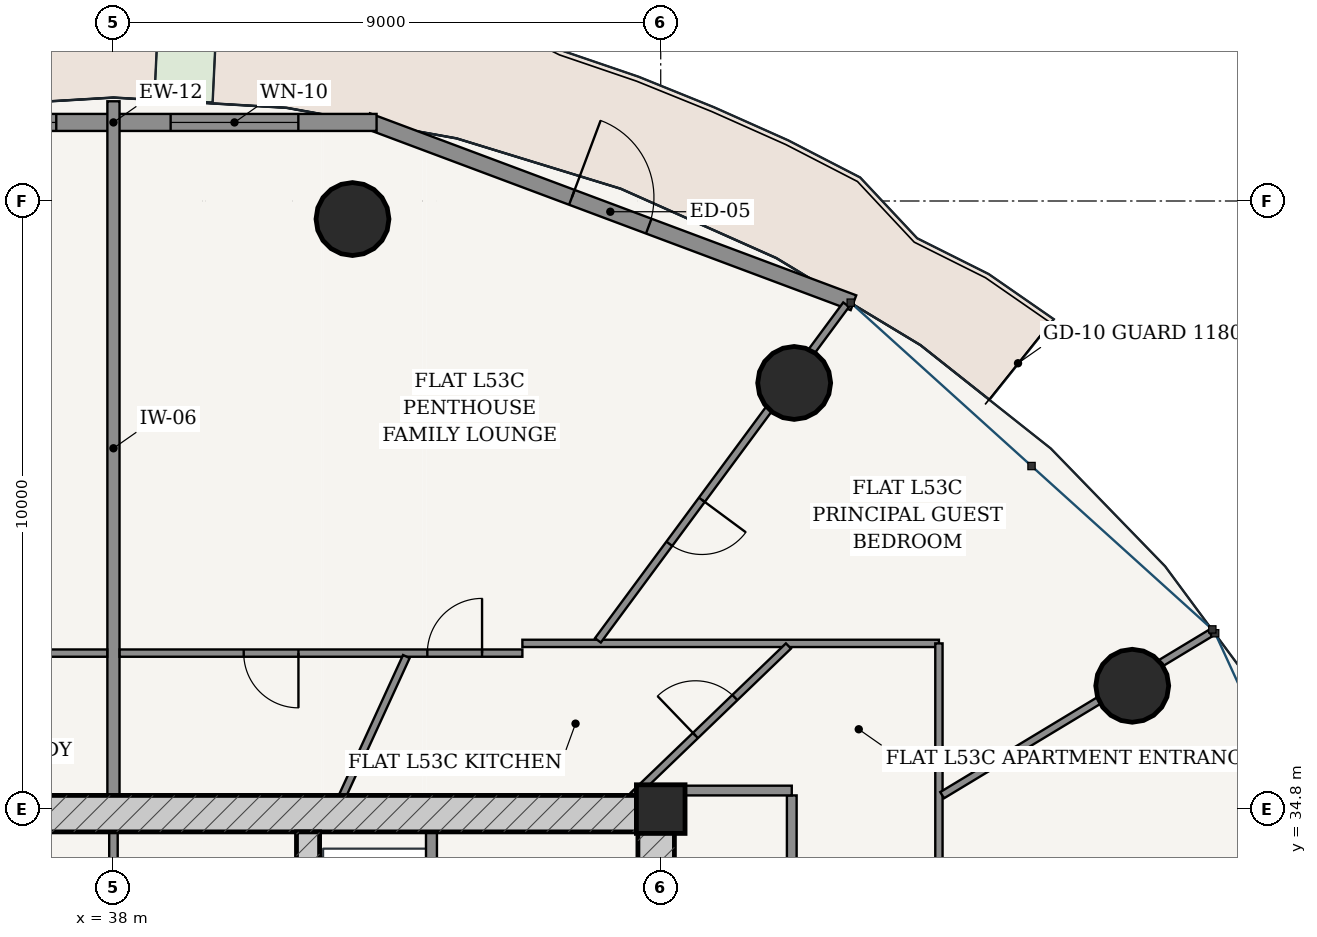
"""IFC4 building model, lengths in metres.
Left out: names, types, materials, properties, quantities, classifications, styles, units other than length and angle.
Written with IfcOpenShell. Run it as: python <this file> out.ifc"""

import sys

from ifc_helpers import new_model, si_unit, direction, frame, frame_2d, origin, origin_2d, place, context, subcontext, project, spatial, rectangle, hollow_circle, extrude, source, transform, mapped, element, fill, save


model = new_model("IFC4")
c1 = context("Model", 3, precision=1e-05, world=origin(), true_north=direction((-0.2419218956, 0.970295726276)))
c2 = subcontext(c1, "Body", "Model", "MODEL_VIEW")
j1 = project(units=[si_unit("LENGTHUNIT", "METRE"), si_unit("PLANEANGLEUNIT", "RADIAN")], contexts=[c1])
p1 = place(None, origin())
s1 = spatial("IfcSite", under=j1, at=p1, CompositionType="ELEMENT")
p2 = place(p1, origin())
s2 = spatial("IfcBuilding", under=s1, at=p2, CompositionType="ELEMENT")
p3 = place(p2, frame((0.0, 0.0, 202.3)))
s3 = spatial("IfcBuildingStorey", under=s2, at=p3, CompositionType="ELEMENT", Elevation=202.3)
p4 = place(p3, frame((47.0, 34.8, 0.0), z_axis=(0.0, 0.0, 1.0), x_axis=(1.0, 0.0, 0.0)))
e1 = element("IfcColumn", 1, at=p4, inside=s3, PredefinedType="COLUMN", context=c2, shape_type="SweptSolid", body=[
    extrude(rectangle(XDim=0.8, YDim=0.8, at=origin_2d()), origin(), (0.0, 0.0, 1.0), 3.7),
])
p5 = place(p3, frame((28.775, 34.725, 0.0), z_axis=(0.0, 0.0, 1.0), x_axis=(1.0, 0.0, 0.0)))
e2 = element("IfcWall", 2, at=p5, inside=s3, PredefinedType="SHEAR", context=c2, shape_type="SweptSolid", body=[
    extrude(rectangle(XDim=18.45, YDim=0.6, at=frame_2d((9.225, 0.0))), origin(), (0.0, 0.0, 1.0), 3.435),
])
p6 = place(p3, frame((46.925, 19.175, 0.0), z_axis=(0.0, 0.0, 1.0), x_axis=(0.0, 1.0, 0.0)))
e3 = element("IfcWall", 3, at=p6, inside=s3, PredefinedType="SHEAR", context=c2, shape_type="SweptSolid", body=[
    extrude(rectangle(XDim=15.25, YDim=0.6, at=frame_2d((7.625, 0.0))), origin(), (0.0, 0.0, 1.0), 3.435),
])
p7 = place(p6, frame((9.875, 0.0, 0.0)))
e4 = element("IfcOpeningElement", 4, at=p7, cuts=e3, PredefinedType="OPENING", context=c2, shape_type="SweptSolid", body=[
    extrude(rectangle(XDim=1.5, YDim=2.2, at=frame_2d((0.75, 1.1))), frame((0.0, 0.31, 0.0), z_axis=(0.0, -1.0, 0.0), x_axis=(1.0, 0.0, 0.0)), (0.0, 0.0, 1.0), 0.62),
])
p8 = place(p3, frame((41.2, 19.175, 0.0), z_axis=(0.0, 0.0, 1.0), x_axis=(0.0, 1.0, 0.0)))
e5 = element("IfcWall", 5, at=p8, inside=s3, PredefinedType="SHEAR", context=c2, shape_type="SweptSolid", body=[
    extrude(rectangle(XDim=15.25, YDim=0.38, at=frame_2d((7.625, 0.0))), origin(), (0.0, 0.0, 1.0), 3.435),
])
p9 = place(p8, frame((7.8, 0.0, 0.0)))
e6 = element("IfcOpeningElement", 6, at=p9, cuts=e5, PredefinedType="OPENING", context=c2, shape_type="SweptSolid", body=[
    extrude(rectangle(XDim=1.05, YDim=2.15, at=frame_2d((0.525, 1.075))), frame((0.0, 0.2, 0.0), z_axis=(0.0, -1.0, 0.0), x_axis=(1.0, 0.0, 0.0)), (0.0, 0.0, 1.0), 0.4),
])
for number, where, z_axis, x_axis in (
    (7, (54.754, 36.828, 0.0), (0.0, 0.0, 1.0), (1.0, 0.0, 0.0)),
    (8, (49.195, 41.808, 0.0), (0.0, 0.0, 1.0), (1.0, 0.0, 0.0)),
    (9, (41.931, 44.503, 0.0), (0.0, 0.0, 1.0), (1.0, 0.0, 0.0)),
):
    element("IfcColumn", number, at=place(p3, frame(where, z_axis=z_axis, x_axis=x_axis)), inside=s3, PredefinedType="COLUMN", context=c2, shape_type="SweptSolid", body=[
        extrude(hollow_circle(Radius=0.6, WallThickness=0.038, at=origin_2d()), origin(), (0.0, 0.0, 1.0), 3.7),
    ])
p10 = place(p3, frame((50.17, 43.127, 0.0), z_axis=(0.0, 0.0, 1.0), x_axis=(-0.936556918375, 0.350515532672, 0.0)))
e10 = element("IfcWall", 10, at=p10, inside=s3, PredefinedType="SOLIDWALL", context=c2, shape_type="SweptSolid", body=[
    extrude(rectangle(XDim=8.539, YDim=0.26, at=frame_2d((4.27, 0.0))), origin(), (0.0, 0.0, 1.0), 3.435),
])
p11 = place(p10, frame((3.594, 0.0, 0.0)))
e11 = element("IfcOpeningElement", 11, at=p11, cuts=e10, PredefinedType="OPENING", context=c2, shape_type="SweptSolid", body=[
    extrude(rectangle(XDim=1.35, YDim=2.2, at=frame_2d((0.675, 1.1))), frame((0.0, 0.14, 0.0), z_axis=(0.0, -1.0, 0.0), x_axis=(1.0, 0.0, 0.0)), (0.0, 0.0, 1.0), 0.28),
])
p12 = place(p3, frame((42.327, 46.092, 0.0), z_axis=(0.0, 0.0, 1.0), x_axis=(-1.0, 0.0, 0.0)))
e12 = element("IfcWall", 12, at=p12, inside=s3, PredefinedType="SOLIDWALL", context=c2, shape_type="SweptSolid", body=[
    extrude(rectangle(XDim=8.654, YDim=0.28, at=frame_2d((4.327, 0.0))), origin(), (0.0, 0.0, 1.0), 3.435),
])
p13 = place(p12, frame((1.287, 0.0, 0.85)))
e13 = element("IfcOpeningElement", 13, at=p13, cuts=e12, PredefinedType="OPENING", context=c2, shape_type="SweptSolid", body=[
    extrude(rectangle(XDim=2.1, YDim=1.95, at=frame_2d((1.05, 0.975))), frame((0.0, 0.15, 0.0), z_axis=(0.0, -1.0, 0.0), x_axis=(1.0, 0.0, 0.0)), (0.0, 0.0, 1.0), 0.3),
])
p14 = place(p12, frame((5.268, 0.0, 0.85)))
e14 = element("IfcOpeningElement", 14, at=p14, cuts=e12, PredefinedType="OPENING", context=c2, shape_type="SweptSolid", body=[
    extrude(rectangle(XDim=2.1, YDim=1.95, at=frame_2d((1.05, 0.975))), frame((0.0, 0.15, 0.0), z_axis=(0.0, -1.0, 0.0), x_axis=(1.0, 0.0, 0.0)), (0.0, 0.0, 1.0), 0.3),
])
p15 = place(p3, frame((43.23, 28.52, 0.0), z_axis=(0.0, 0.0, 1.0), x_axis=(0.0, 1.0, 0.0)))
e15 = element("IfcWall", 15, at=p15, inside=s3, PredefinedType="PARTITIONING", context=c2, shape_type="SweptSolid", body=[
    extrude(rectangle(XDim=5.905, YDim=0.18, at=frame_2d((2.953, 0.0))), origin(), (0.0, 0.0, 1.0), 3.435),
])
p16 = place(p15, frame((0.905, 0.0, 0.0)))
e16 = element("IfcOpeningElement", 16, at=p16, cuts=e15, PredefinedType="OPENING", context=c2, shape_type="SweptSolid", body=[
    extrude(rectangle(XDim=0.85, YDim=2.1, at=frame_2d((0.425, 1.05))), frame((0.0, 0.1, 0.0), z_axis=(0.0, -1.0, 0.0), x_axis=(1.0, 0.0, 0.0)), (0.0, 0.0, 1.0), 0.2),
])
p17 = place(p15, frame((3.655, 0.0, 0.0)))
e17 = element("IfcOpeningElement", 17, at=p17, cuts=e15, PredefinedType="OPENING", context=c2, shape_type="SweptSolid", body=[
    extrude(rectangle(XDim=1.15, YDim=2.2, at=frame_2d((0.575, 1.1))), frame((0.0, 0.1, 0.0), z_axis=(0.0, -1.0, 0.0), x_axis=(1.0, 0.0, 0.0)), (0.0, 0.0, 1.0), 0.2),
])
p18 = place(p3, frame((38.0, 28.56, 0.0), z_axis=(0.0, 0.0, 1.0), x_axis=(0.0, 1.0, 0.0)))
e18 = element("IfcWall", 18, at=p18, inside=s3, PredefinedType="PARTITIONING", context=c2, shape_type="SweptSolid", body=[
    extrude(rectangle(XDim=5.865, YDim=0.14, at=frame_2d((2.933, 0.0))), origin(), (0.0, 0.0, 1.0), 3.435),
])
p19 = place(p3, frame((49.155, 16.725, 0.0), z_axis=(0.0, 0.0, 1.0), x_axis=(0.0, 1.0, 0.0)))
e19 = element("IfcWall", 19, at=p19, inside=s3, PredefinedType="PARTITIONING", context=c2, shape_type="SweptSolid", body=[
    extrude(rectangle(XDim=18.3, YDim=0.16, at=frame_2d((9.15, 0.0))), origin(), (0.0, 0.0, 1.0), 2.951),
])
p20 = place(p19, frame((15.302, 0.0, 0.0)))
e20 = element("IfcOpeningElement", 20, at=p20, cuts=e19, PredefinedType="OPENING", context=c2, shape_type="SweptSolid", body=[
    extrude(rectangle(XDim=0.98, YDim=2.2, at=frame_2d((0.49, 1.1))), frame((0.0, 0.09, 0.0), z_axis=(0.0, -1.0, 0.0), x_axis=(1.0, 0.0, 0.0)), (0.0, 0.0, 1.0), 0.18),
])
p21 = place(p3, frame((47.225, 35.105, 0.0), z_axis=(0.0, 0.0, 1.0), x_axis=(1.0, 0.0, 0.0)))
e21 = element("IfcWall", 21, at=p21, inside=s3, PredefinedType="PARTITIONING", context=c2, shape_type="SweptSolid", body=[
    extrude(rectangle(XDim=1.93, YDim=0.16, at=frame_2d((0.965, 0.0))), origin(), (0.0, 0.0, 1.0), 3.435),
])
p22 = place(p3, frame((38.0, 35.027, 0.0), z_axis=(0.0, 0.0, 1.0), x_axis=(0.0, 1.0, 0.0)))
e22 = element("IfcWall", 22, at=p22, inside=s3, PredefinedType="PARTITIONING", context=c2, shape_type="SweptSolid", body=[
    extrude(rectangle(XDim=11.413, YDim=0.2, at=frame_2d((5.707, 0.0))), origin(), (0.0, 0.0, 1.0), 2.52),
])
p23 = place(p3, frame((31.275, 37.365, 0.0), z_axis=(0.0, 0.0, 1.0), x_axis=(1.0, 0.0, 0.0)))
e23 = element("IfcWall", 23, at=p23, inside=s3, PredefinedType="PARTITIONING", context=c2, shape_type="SweptSolid", body=[
    extrude(rectangle(XDim=6.623, YDim=0.12, at=frame_2d((3.312, 0.0))), origin(), (0.0, 0.0, 1.0), 2.951),
])
p24 = place(p23, frame((4.413, 0.0, 0.0)))
e24 = element("IfcOpeningElement", 24, at=p24, cuts=e23, PredefinedType="OPENING", context=c2, shape_type="SweptSolid", body=[
    extrude(rectangle(XDim=0.86, YDim=2.15, at=frame_2d((0.43, 1.075))), frame((0.0, 0.07, 0.0), z_axis=(0.0, -1.0, 0.0), x_axis=(1.0, 0.0, 0.0)), (0.0, 0.0, 1.0), 0.14),
])
p25 = place(p23, frame((1.328, 0.0, 0.0)))
e25 = element("IfcOpeningElement", 25, at=p25, cuts=e23, PredefinedType="OPENING", context=c2, shape_type="SweptSolid", body=[
    extrude(rectangle(XDim=0.9, YDim=2.15, at=frame_2d((0.45, 1.075))), frame((0.0, 0.07, 0.0), z_axis=(0.0, -1.0, 0.0), x_axis=(1.0, 0.0, 0.0)), (0.0, 0.0, 1.0), 0.14),
])
p26 = place(p3, frame((38.102, 37.365, 0.0), z_axis=(0.0, 0.0, 1.0), x_axis=(1.0, 0.0, 0.0)))
e26 = element("IfcWall", 26, at=p26, inside=s3, PredefinedType="PARTITIONING", context=c2, shape_type="SweptSolid", body=[
    extrude(rectangle(XDim=6.623, YDim=0.12, at=frame_2d((3.312, 0.0))), origin(), (0.0, 0.0, 1.0), 2.951),
])
p27 = place(p26, frame((5.06, 0.0, 0.0)))
e27 = element("IfcOpeningElement", 27, at=p27, cuts=e26, PredefinedType="OPENING", context=c2, shape_type="SweptSolid", body=[
    extrude(rectangle(XDim=0.9, YDim=2.15, at=frame_2d((0.45, 1.075))), frame((0.0, 0.07, 0.0), z_axis=(0.0, -1.0, 0.0), x_axis=(1.0, 0.0, 0.0)), (0.0, 0.0, 1.0), 0.14),
])
p28 = place(p26, frame((2.04, 0.0, 0.0)))
e28 = element("IfcOpeningElement", 28, at=p28, cuts=e26, PredefinedType="OPENING", context=c2, shape_type="SweptSolid", body=[
    extrude(rectangle(XDim=0.9, YDim=2.15, at=frame_2d((0.45, 1.075))), frame((0.0, 0.07, 0.0), z_axis=(0.0, -1.0, 0.0), x_axis=(1.0, 0.0, 0.0)), (0.0, 0.0, 1.0), 0.14),
])
p29 = place(p3, frame((44.725, 37.525, 0.0), z_axis=(0.0, 0.0, 1.0), x_axis=(1.0, 0.0, 0.0)))
e29 = element("IfcWall", 29, at=p29, inside=s3, PredefinedType="PARTITIONING", context=c2, shape_type="SweptSolid", body=[
    extrude(rectangle(XDim=6.85, YDim=0.12, at=frame_2d((3.425, 0.0))), origin(), (0.0, 0.0, 1.0), 2.951),
])
p30 = place(p3, frame((51.575, 37.525, 0.0), z_axis=(0.0, 0.0, 1.0), x_axis=(0.0, -1.0, 0.0)))
e30 = element("IfcWall", 30, at=p30, inside=s3, PredefinedType="PARTITIONING", context=c2, shape_type="SweptSolid", body=[
    extrude(rectangle(XDim=22.89, YDim=0.12, at=frame_2d((11.445, 0.0))), origin(), (0.0, 0.0, 1.0), 2.951),
])
p31 = place(p30, frame((4.102, 0.0, 0.0)))
e31 = element("IfcOpeningElement", 31, at=p31, cuts=e30, PredefinedType="OPENING", context=c2, shape_type="SweptSolid", body=[
    extrude(rectangle(XDim=0.9, YDim=2.15, at=frame_2d((0.45, 1.075))), frame((0.0, 0.07, 0.0), z_axis=(0.0, -1.0, 0.0), x_axis=(1.0, 0.0, 0.0)), (0.0, 0.0, 1.0), 0.14),
])
p32 = place(p30, frame((19.163, 0.0, 0.0)))
e32 = element("IfcOpeningElement", 32, at=p32, cuts=e30, PredefinedType="OPENING", context=c2, shape_type="SweptSolid", body=[
    extrude(rectangle(XDim=0.86, YDim=2.15, at=frame_2d((0.43, 1.075))), frame((0.0, 0.07, 0.0), z_axis=(0.0, -1.0, 0.0), x_axis=(1.0, 0.0, 0.0)), (0.0, 0.0, 1.0), 0.14),
])
p33 = place(p30, frame((13.046, 0.0, 0.0)))
e33 = element("IfcOpeningElement", 33, at=p33, cuts=e30, PredefinedType="OPENING", context=c2, shape_type="SweptSolid", body=[
    extrude(rectangle(XDim=0.9, YDim=2.15, at=frame_2d((0.45, 1.075))), frame((0.0, 0.07, 0.0), z_axis=(0.0, -1.0, 0.0), x_axis=(1.0, 0.0, 0.0)), (0.0, 0.0, 1.0), 0.14),
])
p34 = place(p3, frame((51.628, 35.029, 0.0), z_axis=(0.0, 0.0, 1.0), x_axis=(0.856041879651, 0.516906471505, 0.0)))
e34 = element("IfcWall", 34, at=p34, inside=s3, PredefinedType="PARTITIONING", context=c2, shape_type="SweptSolid", body=[
    extrude(rectangle(XDim=5.149, YDim=0.12, at=frame_2d((2.574, 0.0))), origin(), (0.0, 0.0, 1.0), 2.951),
])
p35 = place(p3, frame((45.967, 37.575, 0.0), z_axis=(0.0, 0.0, 1.0), x_axis=(0.59452500855, 0.804077119565, 0.0)))
e35 = element("IfcWall", 35, at=p35, inside=s3, PredefinedType="PARTITIONING", context=c2, shape_type="SweptSolid", body=[
    extrude(rectangle(XDim=6.867, YDim=0.12, at=frame_2d((3.434, 0.0))), origin(), (0.0, 0.0, 1.0), 2.951),
])
p36 = place(p35, frame((1.975, 0.0, 0.0)))
e36 = element("IfcOpeningElement", 36, at=p36, cuts=e35, PredefinedType="OPENING", context=c2, shape_type="SweptSolid", body=[
    extrude(rectangle(XDim=0.9, YDim=2.15, at=frame_2d((0.45, 1.075))), frame((0.0, 0.07, 0.0), z_axis=(0.0, -1.0, 0.0), x_axis=(1.0, 0.0, 0.0)), (0.0, 0.0, 1.0), 0.14),
])
p37 = place(p3, frame((46.549, 35.026, 0.0), z_axis=(0.0, 0.0, 1.0), x_axis=(0.720557461206, 0.693395230082, 0.0)))
e37 = element("IfcWall", 37, at=p37, inside=s3, PredefinedType="PARTITIONING", context=c2, shape_type="SweptSolid", body=[
    extrude(rectangle(XDim=3.541, YDim=0.12, at=frame_2d((1.771, 0.0))), origin(), (0.0, 0.0, 1.0), 2.951),
])
p38 = place(p37, frame((1.419, 0.0, 0.0)))
e38 = element("IfcOpeningElement", 38, at=p38, cuts=e37, PredefinedType="OPENING", context=c2, shape_type="SweptSolid", body=[
    extrude(rectangle(XDim=0.9, YDim=2.15, at=frame_2d((0.45, 1.075))), frame((0.0, 0.07, 0.0), z_axis=(0.0, -1.0, 0.0), x_axis=(1.0, 0.0, 0.0)), (0.0, 0.0, 1.0), 0.14),
])
p39 = place(p3, frame((41.771, 35.027, 0.0), z_axis=(0.0, 0.0, 1.0), x_axis=(0.416688202143, 0.909049471808, 0.0)))
e39 = element("IfcWall", 39, at=p39, inside=s3, PredefinedType="PARTITIONING", context=c2, shape_type="SweptSolid", body=[
    extrude(rectangle(XDim=2.51, YDim=0.12, at=frame_2d((1.255, 0.0))), origin(), (0.0, 0.0, 1.0), 3.435),
])
m1 = source(origin(), c2, "Body", "SweptSolid", [
    extrude(rectangle(XDim=1.35, YDim=2.2, at=frame_2d((0.675, 1.1))), frame((0.0, 0.025, 0.0), z_axis=(0.0, -1.0, 0.0), x_axis=(1.0, 0.0, 0.0)), (0.0, 0.0, 1.0), 0.05),
])
p40 = place(p11, frame((1.35, 0.0, 0.0), z_axis=(0.0, 0.0, 1.0), x_axis=(-1.0, 0.0, 0.0)))
e40 = element("IfcDoor", 40, at=p40, inside=s3, OperationType="SINGLE_SWING_LEFT", PredefinedType="DOOR", context=c2, shape_type="MappedRepresentation", body=[
    mapped(m1, transform((0.0, 0.0, 0.0), scale=1.0)),
])
fill(e11, e40)
m2 = source(origin(), c2, "Body", "SweptSolid", [
    extrude(rectangle(XDim=2.1, YDim=1.95, at=frame_2d((1.05, 0.975))), frame((0.0, 0.03, 0.0), z_axis=(0.0, -1.0, 0.0), x_axis=(1.0, 0.0, 0.0)), (0.0, 0.0, 1.0), 0.06),
])
p41 = place(p13, origin())
e41 = element("IfcWindow", 41, at=p41, inside=s3, PartitioningType="SINGLE_PANEL", PredefinedType="WINDOW", context=c2, shape_type="MappedRepresentation", body=[
    mapped(m2, transform((0.0, 0.0, 0.0), scale=1.0)),
])
fill(e13, e41)
p42 = place(p14, origin())
e42 = element("IfcWindow", 42, at=p42, inside=s3, PartitioningType="SINGLE_PANEL", PredefinedType="WINDOW", context=c2, shape_type="MappedRepresentation", body=[
    mapped(m2, transform((0.0, 0.0, 0.0), scale=1.0)),
])
fill(e14, e42)
m3 = source(origin(), c2, "Body", "SweptSolid", [
    extrude(rectangle(XDim=0.9, YDim=2.15, at=frame_2d((0.45, 1.075))), frame((0.0, 0.025, 0.0), z_axis=(0.0, -1.0, 0.0), x_axis=(1.0, 0.0, 0.0)), (0.0, 0.0, 1.0), 0.05),
])
p43 = place(p38, origin())
e43 = element("IfcDoor", 43, at=p43, inside=s3, OperationType="SINGLE_SWING_LEFT", PredefinedType="DOOR", context=c2, shape_type="MappedRepresentation", body=[
    mapped(m3, transform((0.0, 0.0, 0.0), scale=1.0)),
])
fill(e38, e43)
p44 = place(p27, origin())
e44 = element("IfcDoor", 44, at=p44, inside=s3, OperationType="SINGLE_SWING_RIGHT", PredefinedType="DOOR", context=c2, shape_type="MappedRepresentation", body=[
    mapped(m3, transform((0.0, 0.0, 0.0), scale=1.0)),
])
fill(e27, e44)
p45 = place(p28, frame((0.9, 0.0, 0.0), z_axis=(0.0, 0.0, 1.0), x_axis=(-1.0, 0.0, 0.0)))
e45 = element("IfcDoor", 45, at=p45, inside=s3, OperationType="SINGLE_SWING_LEFT", PredefinedType="DOOR", context=c2, shape_type="MappedRepresentation", body=[
    mapped(m3, transform((0.0, 0.0, 0.0), scale=1.0)),
])
fill(e28, e45)
p46 = place(p36, frame((0.9, 0.0, 0.0), z_axis=(0.0, 0.0, 1.0), x_axis=(-1.0, 0.0, 0.0)))
e46 = element("IfcDoor", 46, at=p46, inside=s3, OperationType="SINGLE_SWING_LEFT", PredefinedType="DOOR", context=c2, shape_type="MappedRepresentation", body=[
    mapped(m3, transform((0.0, 0.0, 0.0), scale=1.0)),
])
fill(e36, e46)
save(model, sys.argv[1])
